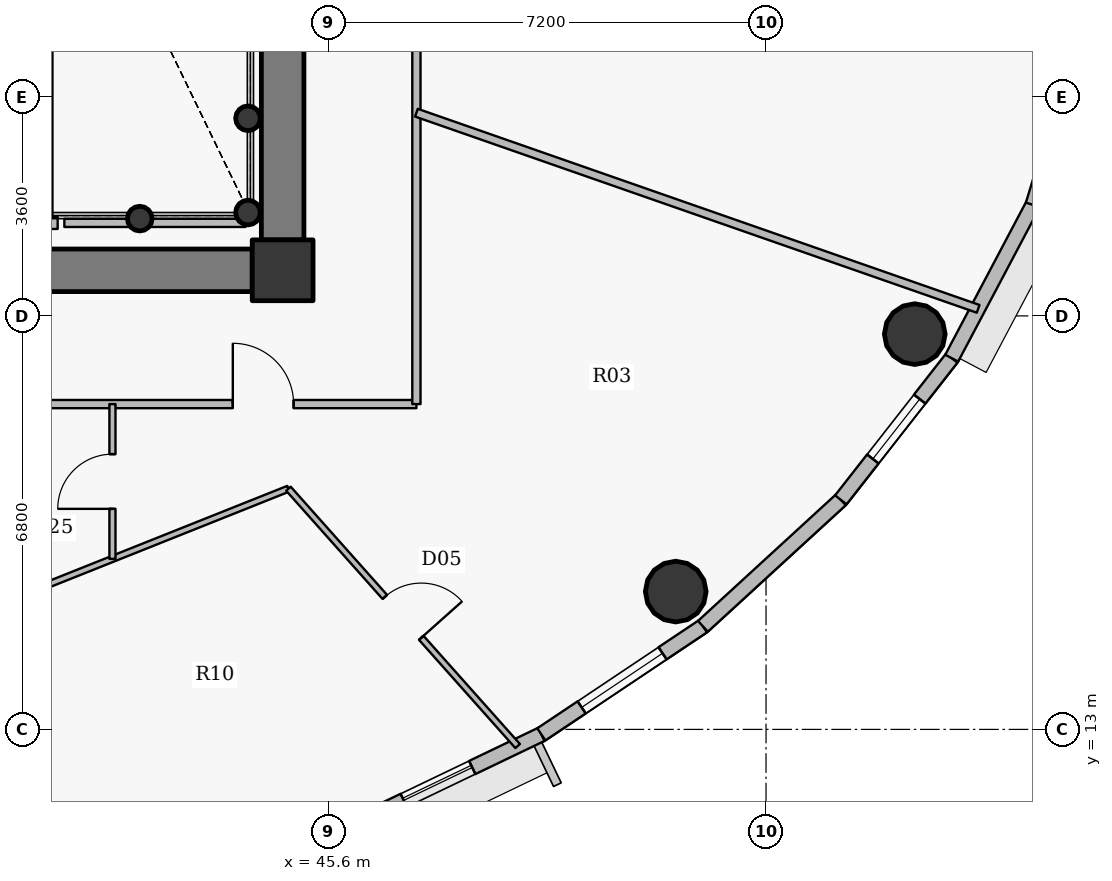
"""IFC4 building model, lengths in metres.
Left out: names, types, materials, properties, quantities, classifications, styles, units other than length and angle.
Written with IfcOpenShell. Run it as: python <this file> out.ifc"""

import sys

from ifc_helpers import new_model, si_unit, direction, frame, frame_2d, origin, origin_2d, place, context, subcontext, project, spatial, rectangle, hollow_circle, extrude, source, transform, mapped, element, fill, save


model = new_model("IFC4")
c1 = context("Model", 3, precision=1e-05, world=origin(), true_north=direction((0.0, 1.0)))
c2 = subcontext(c1, "Body", "Model", "MODEL_VIEW")
j1 = project(units=[si_unit("LENGTHUNIT", "METRE"), si_unit("PLANEANGLEUNIT", "RADIAN")], contexts=[c1])
p1 = place(None, origin())
s1 = spatial("IfcSite", under=j1, at=p1, CompositionType="ELEMENT")
p2 = place(p1, origin())
s2 = spatial("IfcBuilding", under=s1, at=p2, CompositionType="ELEMENT")
p3 = place(p2, frame((0.0, 0.0, 303.0)))
s3 = spatial("IfcBuildingStorey", under=s2, at=p3, CompositionType="ELEMENT", Elevation=303.0)
p4 = place(p3, frame((44.85, 20.55, 0.0), z_axis=(0.0, 0.0, 1.0), x_axis=(1.0, 0.0, 0.0)))
e1 = element("IfcColumn", 1, at=p4, inside=s3, PredefinedType="COLUMN", context=c2, shape_type="SweptSolid", body=[
    extrude(rectangle(XDim=1.0, YDim=1.0, at=origin_2d()), origin(), (0.0, 0.0, 1.0), 3.75),
])
for number, where, z_axis, x_axis in (
    (2, (44.28, 21.5, 0.0), (0.0, 0.0, 1.0), (1.0, 0.0, 0.0)),
    (3, (44.28, 23.05, 0.0), (0.0, 0.0, 1.0), (1.0, 0.0, 0.0)),
    (4, (42.5, 21.4, 0.0), (0.0, 0.0, 1.0), (1.0, 0.0, 0.0)),
):
    element("IfcColumn", number, at=place(p3, frame(where, z_axis=z_axis, x_axis=x_axis)), inside=s3, PredefinedType="COLUMN", context=c2, shape_type="SweptSolid", body=[
        extrude(hollow_circle(Radius=0.203, WallThickness=0.016, at=origin_2d()), origin(), (0.0, 0.0, 1.0), 3.75),
    ])
p5 = place(p3, frame((44.85, 32.95, 0.0), z_axis=(0.0, 0.0, 1.0), x_axis=(0.0, -1.0, 0.0)))
e5 = element("IfcWall", 5, at=p5, inside=s3, PredefinedType="SHEAR", context=c2, shape_type="SweptSolid", body=[
    extrude(rectangle(XDim=11.9, YDim=0.7, at=frame_2d((5.95, 0.0))), origin(), (0.0, 0.0, 1.0), 3.05),
])
p6 = place(p3, frame((44.35, 20.55, 0.0), z_axis=(0.0, 0.0, 1.0), x_axis=(-1.0, 0.0, 0.0)))
e6 = element("IfcWall", 6, at=p6, inside=s3, PredefinedType="SHEAR", context=c2, shape_type="SweptSolid", body=[
    extrude(rectangle(XDim=16.7, YDim=0.7, at=frame_2d((8.35, 0.0))), origin(), (0.0, 0.0, 1.0), 3.05),
])
p7 = place(p6, frame((12.925, 0.0, 0.0)))
e7 = element("IfcOpeningElement", 7, at=p7, cuts=e6, PredefinedType="OPENING", context=c2, shape_type="SweptSolid", body=[
    extrude(rectangle(XDim=1.15, YDim=2.15, at=origin_2d()), frame((0.575, 0.36, 1.075), z_axis=(0.0, -1.0, 0.0), x_axis=(1.0, 0.0, 0.0)), (0.0, 0.0, 1.0), 0.72),
])
p8 = place(p6, frame((9.1, 0.0, 0.0)))
e8 = element("IfcOpeningElement", 8, at=p8, cuts=e6, PredefinedType="OPENING", context=c2, shape_type="SweptSolid", body=[
    extrude(rectangle(XDim=1.15, YDim=2.15, at=origin_2d()), frame((0.575, 0.36, 1.075), z_axis=(0.0, -1.0, 0.0), x_axis=(1.0, 0.0, 0.0)), (0.0, 0.0, 1.0), 0.72),
])
for number, where, z_axis, x_axis in (
    (9, (51.315, 15.267, 0.0), (0.0, 0.0, 1.0), (1.0, 0.0, 0.0)),
    (10, (55.246, 19.5, 0.0), (0.0, 0.0, 1.0), (1.0, 0.0, 0.0)),
):
    element("IfcColumn", number, at=place(p3, frame(where, z_axis=z_axis, x_axis=x_axis)), inside=s3, PredefinedType="COLUMN", context=c2, shape_type="SweptSolid", body=[
        extrude(hollow_circle(Radius=0.5, WallThickness=0.032, at=origin_2d()), origin(), (0.0, 0.0, 1.0), 3.75),
    ])
p9 = place(p3, frame((49.104, 12.918, 0.0), z_axis=(0.0, 0.0, 1.0), x_axis=(-0.901573741254, -0.43262546051, 0.0)))
e11 = element("IfcWall", 11, at=p9, inside=s3, PredefinedType="SOLIDWALL", context=c2, shape_type="SweptSolid", body=[
    extrude(rectangle(XDim=3.307, YDim=0.24, at=frame_2d((1.653, 0.0))), origin(), (0.0, 0.0, 1.0), 3.5),
])
p10 = place(p9, frame((1.26, 0.0, 0.9)))
e12 = element("IfcOpeningElement", 12, at=p10, cuts=e11, PredefinedType="OPENING", context=c2, shape_type="SweptSolid", body=[
    extrude(rectangle(XDim=1.25, YDim=1.65, at=origin_2d()), frame((0.625, 0.13, 0.825), z_axis=(0.0, -1.0, 0.0), x_axis=(1.0, 0.0, 0.0)), (0.0, 0.0, 1.0), 0.26),
])
p11 = place(p3, frame((51.762, 14.696, 0.0), z_axis=(0.0, 0.0, 1.0), x_axis=(-0.831250592635, -0.55589787933, 0.0)))
e13 = element("IfcWall", 13, at=p11, inside=s3, PredefinedType="SOLIDWALL", context=c2, shape_type="SweptSolid", body=[
    extrude(rectangle(XDim=3.197, YDim=0.24, at=frame_2d((1.599, 0.0))), origin(), (0.0, 0.0, 1.0), 3.5),
])
p12 = place(p11, frame((0.799, 0.0, 0.9)))
e14 = element("IfcOpeningElement", 14, at=p12, cuts=e13, PredefinedType="OPENING", context=c2, shape_type="SweptSolid", body=[
    extrude(rectangle(XDim=1.6, YDim=1.75, at=origin_2d()), frame((0.8, 0.13, 0.875), z_axis=(0.0, -1.0, 0.0), x_axis=(1.0, 0.0, 0.0)), (0.0, 0.0, 1.0), 0.26),
])
p13 = place(p3, frame((54.03, 16.775, 0.0), z_axis=(0.0, 0.0, 1.0), x_axis=(-0.737068506972, -0.675818034703, 0.0)))
e15 = element("IfcWall", 15, at=p13, inside=s3, PredefinedType="SOLIDWALL", context=c2, shape_type="SweptSolid", body=[
    extrude(rectangle(XDim=3.077, YDim=0.24, at=frame_2d((1.539, 0.0))), origin(), (0.0, 0.0, 1.0), 3.5),
])
p14 = place(p3, frame((55.854, 19.105, 0.0), z_axis=(0.0, 0.0, 1.0), x_axis=(-0.616337186556, -0.787482363275, 0.0)))
e16 = element("IfcWall", 16, at=p14, inside=s3, PredefinedType="SOLIDWALL", context=c2, shape_type="SweptSolid", body=[
    extrude(rectangle(XDim=2.958, YDim=0.24, at=frame_2d((1.479, 0.0))), origin(), (0.0, 0.0, 1.0), 3.5),
])
p15 = place(p14, frame((0.854, 0.0, 0.9)))
e17 = element("IfcOpeningElement", 17, at=p15, cuts=e16, PredefinedType="OPENING", context=c2, shape_type="SweptSolid", body=[
    extrude(rectangle(XDim=1.25, YDim=1.65, at=origin_2d()), frame((0.625, 0.13, 0.825), z_axis=(0.0, -1.0, 0.0), x_axis=(1.0, 0.0, 0.0)), (0.0, 0.0, 1.0), 0.26),
])
p16 = place(p3, frame((57.188, 21.628, 0.0), z_axis=(0.0, 0.0, 1.0), x_axis=(-0.467628269026, -0.883925224218, 0.0)))
e18 = element("IfcWall", 18, at=p16, inside=s3, PredefinedType="SOLIDWALL", context=c2, shape_type="SweptSolid", body=[
    extrude(rectangle(XDim=2.854, YDim=0.24, at=frame_2d((1.427, 0.0))), origin(), (0.0, 0.0, 1.0), 3.5),
])
p17 = place(p3, frame((58.002, 24.281, 0.0), z_axis=(0.0, 0.0, 1.0), x_axis=(-0.2931213403, -0.956075248012, 0.0)))
e19 = element("IfcWall", 19, at=p17, inside=s3, PredefinedType="SOLIDWALL", context=c2, shape_type="SweptSolid", body=[
    extrude(rectangle(XDim=2.775, YDim=0.24, at=frame_2d((1.388, 0.0))), origin(), (0.0, 0.0, 1.0), 3.5),
])
p18 = place(p17, frame((0.763, 0.0, 0.9)))
e20 = element("IfcOpeningElement", 20, at=p18, cuts=e19, PredefinedType="OPENING", context=c2, shape_type="SweptSolid", body=[
    extrude(rectangle(XDim=1.25, YDim=1.65, at=origin_2d()), frame((0.625, 0.13, 0.825), z_axis=(0.0, -1.0, 0.0), x_axis=(1.0, 0.0, 0.0)), (0.0, 0.0, 1.0), 0.26),
])
p19 = place(p3, frame((24.95, 18.35, 0.0), z_axis=(0.0, 0.0, 1.0), x_axis=(1.0, 0.0, 0.0)))
e21 = element("IfcWall", 21, at=p19, inside=s3, PredefinedType="PARTITIONING", context=c2, shape_type="SweptSolid", body=[
    extrude(rectangle(XDim=22.1, YDim=0.135, at=frame_2d((11.05, 0.0))), origin(), (0.0, 0.0, 1.0), 3.035),
])
p20 = place(p19, frame((8.131, 0.0, 0.0)))
e22 = element("IfcOpeningElement", 22, at=p20, cuts=e21, PredefinedType="OPENING", context=c2, shape_type="SweptSolid", body=[
    extrude(rectangle(XDim=1.0, YDim=2.15, at=origin_2d()), frame((0.5, 0.078, 1.075), z_axis=(0.0, -1.0, 0.0), x_axis=(1.0, 0.0, 0.0)), (0.0, 0.0, 1.0), 0.155),
])
p21 = place(p19, frame((19.081, 0.0, 0.0)))
e23 = element("IfcOpeningElement", 23, at=p21, cuts=e21, PredefinedType="OPENING", context=c2, shape_type="SweptSolid", body=[
    extrude(rectangle(XDim=1.0, YDim=2.15, at=origin_2d()), frame((0.5, 0.078, 1.075), z_axis=(0.0, -1.0, 0.0), x_axis=(1.0, 0.0, 0.0)), (0.0, 0.0, 1.0), 0.155),
])
p22 = place(p3, frame((40.845, 15.323, 0.0), z_axis=(0.0, 0.0, 1.0), x_axis=(0.928815810282, 0.370541752804, 0.0)))
e24 = element("IfcWall", 24, at=p22, inside=s3, PredefinedType="PARTITIONING", context=c2, shape_type="SweptSolid", body=[
    extrude(rectangle(XDim=4.414, YDim=0.1, at=frame_2d((2.207, 0.0))), origin(), (0.0, 0.0, 1.0), 3.035),
])
p23 = place(p3, frame((40.9, 21.33, 0.0), z_axis=(0.0, 0.0, 1.0), x_axis=(1.0, 0.0, 0.0)))
e25 = element("IfcWall", 25, at=p23, inside=s3, PredefinedType="PARTITIONING", context=c2, shape_type="SweptSolid", body=[
    extrude(rectangle(XDim=0.25, YDim=0.2, at=frame_2d((0.125, 0.0))), origin(), (0.0, 0.0, 1.0), 3.035),
])
p24 = place(p3, frame((42.051, 15.804, 0.0), z_axis=(0.0, 0.0, 1.0), x_axis=(0.0, 1.0, 0.0)))
e26 = element("IfcWall", 26, at=p24, inside=s3, PredefinedType="PARTITIONING", context=c2, shape_type="SweptSolid", body=[
    extrude(rectangle(XDim=2.546, YDim=0.1, at=frame_2d((1.273, 0.0))), origin(), (0.0, 0.0, 1.0), 3.5),
])
p25 = place(p24, frame((0.823, 0.0, 0.0)))
e27 = element("IfcOpeningElement", 27, at=p25, cuts=e26, PredefinedType="OPENING", context=c2, shape_type="SweptSolid", body=[
    extrude(rectangle(XDim=0.9, YDim=2.1, at=origin_2d()), frame((0.45, 0.06, 1.05), z_axis=(0.0, -1.0, 0.0), x_axis=(1.0, 0.0, 0.0)), (0.0, 0.0, 1.0), 0.12),
])
p26 = place(p3, frame((44.945, 16.958, 0.0), z_axis=(0.0, 0.0, 1.0), x_axis=(0.665162818086, -0.746698349694, 0.0)))
e28 = element("IfcWall", 28, at=p26, inside=s3, PredefinedType="PARTITIONING", context=c2, shape_type="SweptSolid", body=[
    extrude(rectangle(XDim=5.668, YDim=0.1, at=frame_2d((2.834, 0.0))), origin(), (0.0, 0.0, 1.0), 2.985),
])
p27 = place(p26, frame((2.384, 0.0, 0.0)))
e29 = element("IfcOpeningElement", 29, at=p27, cuts=e28, PredefinedType="OPENING", context=c2, shape_type="SweptSolid", body=[
    extrude(rectangle(XDim=0.9, YDim=2.1, at=origin_2d()), frame((0.45, 0.06, 1.05), z_axis=(0.0, -1.0, 0.0), x_axis=(1.0, 0.0, 0.0)), (0.0, 0.0, 1.0), 0.12),
])
p28 = place(p3, frame((47.05, 18.35, 0.0), z_axis=(0.0, 0.0, 1.0), x_axis=(0.0, 1.0, 0.0)))
e30 = element("IfcWall", 30, at=p28, inside=s3, PredefinedType="PARTITIONING", context=c2, shape_type="SweptSolid", body=[
    extrude(rectangle(XDim=17.3, YDim=0.135, at=frame_2d((8.65, 0.0))), origin(), (0.0, 0.0, 1.0), 3.035),
])
p29 = place(p28, frame((6.155, 0.0, 0.0)))
e31 = element("IfcOpeningElement", 31, at=p29, cuts=e30, PredefinedType="OPENING", context=c2, shape_type="SweptSolid", body=[
    extrude(rectangle(XDim=1.0, YDim=2.15, at=origin_2d()), frame((0.5, 0.078, 1.075), z_axis=(0.0, -1.0, 0.0), x_axis=(1.0, 0.0, 0.0)), (0.0, 0.0, 1.0), 0.155),
])
p30 = place(p3, frame((47.05, 23.142, 0.0), z_axis=(0.0, 0.0, 1.0), x_axis=(0.94410974345, -0.329631297547, 0.0)))
e32 = element("IfcWall", 32, at=p30, inside=s3, PredefinedType="PARTITIONING", context=c2, shape_type="SweptSolid", body=[
    extrude(rectangle(XDim=9.785, YDim=0.135, at=frame_2d((4.893, 0.0))), origin(), (0.0, 0.0, 1.0), 2.985),
])
p31 = place(p3, frame((44.24, 21.33, 0.0), z_axis=(0.0, 0.0, 1.0), x_axis=(-1.0, 0.0, 0.0)))
e33 = element("IfcWall", 33, at=p31, inside=s3, PredefinedType="PARTITIONING", context=c2, shape_type="SweptSolid", body=[
    extrude(rectangle(XDim=2.98, YDim=0.135, at=frame_2d((1.49, 0.0))), origin(), (0.0, 0.0, 1.0), 3.035),
])
p32 = place(p3, frame((44.36, 20.2, 0.0), z_axis=(0.0, 0.0, 1.0), x_axis=(1.0, 0.0, 0.0)))
e34 = element("IfcWall", 34, at=p32, inside=s3, PredefinedType="PARTITIONING", context=c2, shape_type="SweptSolid", body=[
    extrude(rectangle(XDim=0.84, YDim=0.135, at=frame_2d((0.42, 0.0))), origin(), (0.0, 0.0, 1.0), 3.035),
])
p33 = place(p3, frame((45.2, 20.508, 0.0), z_axis=(0.0, 0.0, 1.0), x_axis=(0.0, 1.0, 0.0)))
e35 = element("IfcWall", 35, at=p33, inside=s3, PredefinedType="PARTITIONING", context=c2, shape_type="SweptSolid", body=[
    extrude(rectangle(XDim=0.532, YDim=0.135, at=frame_2d((0.266, 0.0))), origin(), (0.0, 0.0, 1.0), 3.5),
])
m1 = source(origin(), c2, "Body", "SweptSolid", [
    extrude(rectangle(XDim=1.25, YDim=1.65, at=origin_2d()), frame((0.625, 0.03, 0.825), z_axis=(0.0, -1.0, 0.0), x_axis=(1.0, 0.0, 0.0)), (0.0, 0.0, 1.0), 0.06),
])
p34 = place(p10, origin())
e36 = element("IfcWindow", 36, at=p34, inside=s3, PartitioningType="SINGLE_PANEL", PredefinedType="WINDOW", context=c2, shape_type="MappedRepresentation", body=[
    mapped(m1, transform((0.0, 0.0, 0.0), x_axis=(1.0, 0.0, 0.0), y_axis=(0.0, 1.0, 0.0), z_axis=(0.0, 0.0, 1.0), scale=1.0)),
])
fill(e12, e36)
m2 = source(origin(), c2, "Body", "SweptSolid", [
    extrude(rectangle(XDim=1.6, YDim=1.75, at=origin_2d()), frame((0.8, 0.03, 0.875), z_axis=(0.0, -1.0, 0.0), x_axis=(1.0, 0.0, 0.0)), (0.0, 0.0, 1.0), 0.06),
])
p35 = place(p12, origin())
e37 = element("IfcWindow", 37, at=p35, inside=s3, PartitioningType="DOUBLE_PANEL_VERTICAL", PredefinedType="WINDOW", context=c2, shape_type="MappedRepresentation", body=[
    mapped(m2, transform((0.0, 0.0, 0.0), x_axis=(1.0, 0.0, 0.0), y_axis=(0.0, 1.0, 0.0), z_axis=(0.0, 0.0, 1.0), scale=1.0)),
])
fill(e14, e37)
p36 = place(p15, origin())
e38 = element("IfcWindow", 38, at=p36, inside=s3, PartitioningType="SINGLE_PANEL", PredefinedType="WINDOW", context=c2, shape_type="MappedRepresentation", body=[
    mapped(m1, transform((0.0, 0.0, 0.0), x_axis=(1.0, 0.0, 0.0), y_axis=(0.0, 1.0, 0.0), z_axis=(0.0, 0.0, 1.0), scale=1.0)),
])
fill(e17, e38)
m3 = source(origin(), c2, "Body", "SweptSolid", [
    extrude(rectangle(XDim=1.0, YDim=2.15, at=origin_2d()), frame((0.5, 0.025, 1.075), z_axis=(0.0, -1.0, 0.0), x_axis=(1.0, 0.0, 0.0)), (0.0, 0.0, 1.0), 0.05),
])
p37 = place(p21, origin())
e39 = element("IfcDoor", 39, at=p37, inside=s3, OperationType="SINGLE_SWING_LEFT", PredefinedType="DOOR", context=c2, shape_type="MappedRepresentation", body=[
    mapped(m3, transform((0.0, 0.0, 0.0), x_axis=(1.0, 0.0, 0.0), y_axis=(0.0, 1.0, 0.0), z_axis=(0.0, 0.0, 1.0), scale=1.0)),
])
fill(e23, e39)
m4 = source(origin(), c2, "Body", "SweptSolid", [
    extrude(rectangle(XDim=0.9, YDim=2.1, at=origin_2d()), frame((0.45, 0.025, 1.05), z_axis=(0.0, -1.0, 0.0), x_axis=(1.0, 0.0, 0.0)), (0.0, 0.0, 1.0), 0.05),
])
p38 = place(p27, origin())
e40 = element("IfcDoor", 40, at=p38, inside=s3, OperationType="SINGLE_SWING_RIGHT", PredefinedType="DOOR", context=c2, shape_type="MappedRepresentation", body=[
    mapped(m4, transform((0.0, 0.0, 0.0), x_axis=(1.0, 0.0, 0.0), y_axis=(0.0, 1.0, 0.0), z_axis=(0.0, 0.0, 1.0), scale=1.0)),
])
fill(e29, e40)
p39 = place(p25, origin())
e41 = element("IfcDoor", 41, at=p39, inside=s3, OperationType="SINGLE_SWING_LEFT", PredefinedType="DOOR", context=c2, shape_type="MappedRepresentation", body=[
    mapped(m4, transform((0.0, 0.0, 0.0), x_axis=(1.0, 0.0, 0.0), y_axis=(0.0, 1.0, 0.0), z_axis=(0.0, 0.0, 1.0), scale=1.0)),
])
fill(e27, e41)
save(model, sys.argv[1])
